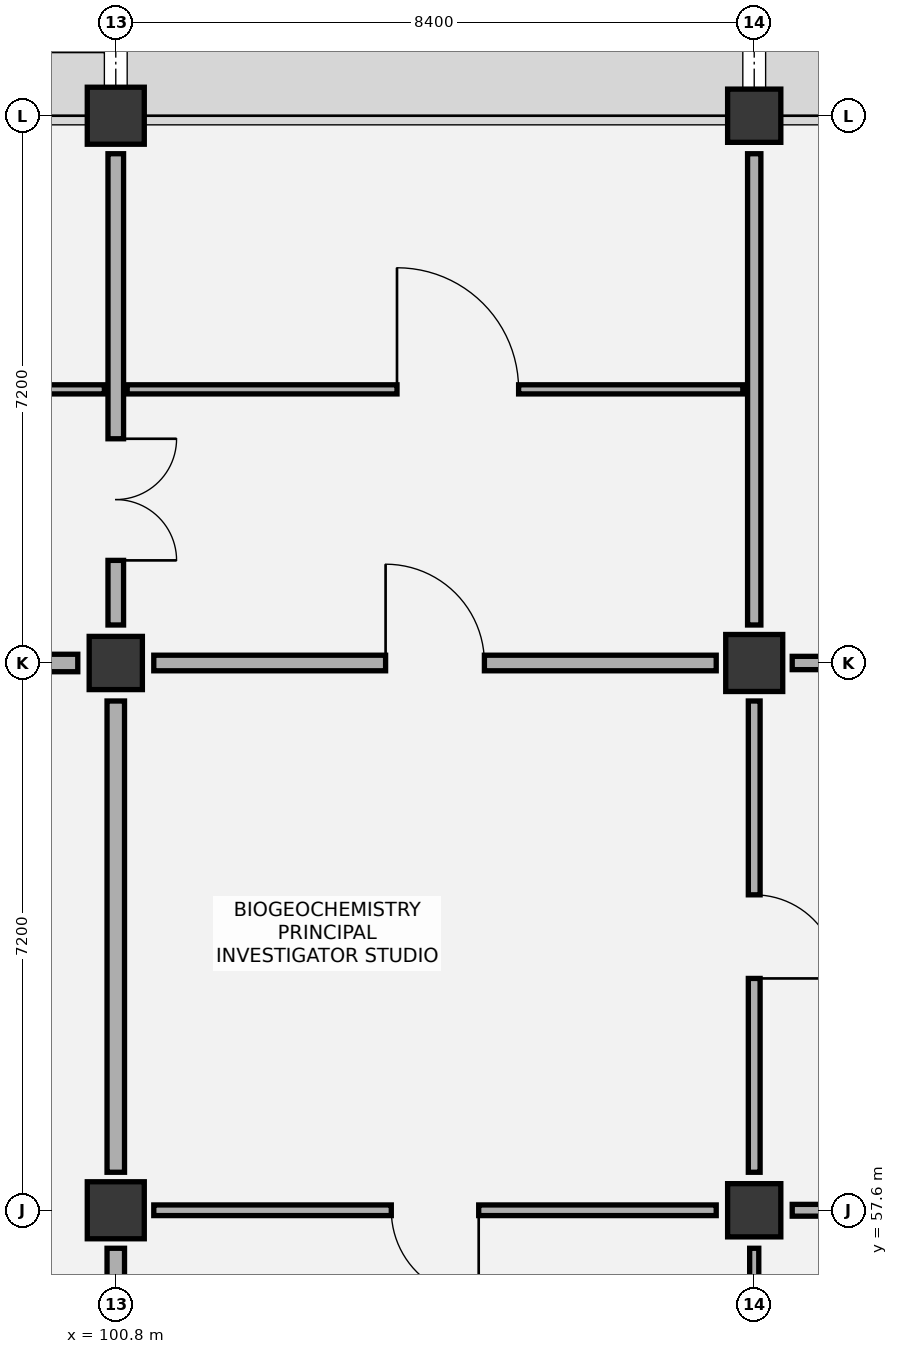
"""IFC4 building model, lengths in metres.
Left out: names, types, materials, properties, quantities, classifications, styles, units other than length and angle.
Written with IfcOpenShell. Run it as: python <this file> out.ifc"""

import sys

from ifc_helpers import new_model, si_unit, direction, frame, frame_2d, origin, origin_2d, place, context, subcontext, project, spatial, rectangle, extrude, element, fill, save


model = new_model("IFC4")
c1 = context("Model", 3, precision=1e-05, world=origin(), true_north=direction((0.0, 1.0)))
c2 = subcontext(c1, "Body", "Model", "MODEL_VIEW")
j1 = project(units=[si_unit("LENGTHUNIT", "METRE"), si_unit("PLANEANGLEUNIT", "RADIAN")], contexts=[c1])
p1 = place(None, origin())
s1 = spatial("IfcSite", under=j1, at=p1, CompositionType="ELEMENT")
p2 = place(p1, origin())
s2 = spatial("IfcBuilding", under=s1, at=p2, CompositionType="ELEMENT")
p3 = place(p2, frame((0.0, 0.0, 39.6)))
s3 = spatial("IfcBuildingStorey", under=s2, at=p3, CompositionType="ELEMENT", Elevation=39.6)
p4 = place(p3, frame((100.8, 57.6, 0.0), z_axis=(0.0, 0.0, 1.0), x_axis=(1.0, 0.0, 0.0)))
e1 = element("IfcColumn", 1, at=p4, inside=s3, PredefinedType="COLUMN", context=c2, shape_type="SweptSolid", body=[
    extrude(rectangle(XDim=0.75, YDim=0.75, at=origin_2d()), origin(), (0.0, 0.0, 1.0), 4.2),
])
p5 = place(p3, frame((100.8, 64.8, 0.0), z_axis=(0.0, 0.0, 1.0), x_axis=(1.0, 0.0, 0.0)))
e2 = element("IfcColumn", 2, at=p5, inside=s3, PredefinedType="COLUMN", context=c2, shape_type="SweptSolid", body=[
    extrude(rectangle(XDim=0.7, YDim=0.7, at=origin_2d()), origin(), (0.0, 0.0, 1.0), 4.2),
])
p6 = place(p3, frame((100.8, 72.0, 0.0), z_axis=(0.0, 0.0, 1.0), x_axis=(1.0, 0.0, 0.0)))
e3 = element("IfcColumn", 3, at=p6, inside=s3, PredefinedType="COLUMN", context=c2, shape_type="SweptSolid", body=[
    extrude(rectangle(XDim=0.75, YDim=0.75, at=origin_2d()), origin(), (0.0, 0.0, 1.0), 4.2),
])
p7 = place(p3, frame((109.2, 57.6, 0.0), z_axis=(0.0, 0.0, 1.0), x_axis=(1.0, 0.0, 0.0)))
e4 = element("IfcColumn", 4, at=p7, inside=s3, PredefinedType="COLUMN", context=c2, shape_type="SweptSolid", body=[
    extrude(rectangle(XDim=0.7, YDim=0.7, at=origin_2d()), origin(), (0.0, 0.0, 1.0), 4.2),
])
p8 = place(p3, frame((109.2, 64.8, 0.0), z_axis=(0.0, 0.0, 1.0), x_axis=(1.0, 0.0, 0.0)))
e5 = element("IfcColumn", 5, at=p8, inside=s3, PredefinedType="COLUMN", context=c2, shape_type="SweptSolid", body=[
    extrude(rectangle(XDim=0.75, YDim=0.75, at=origin_2d()), origin(), (0.0, 0.0, 1.0), 4.2),
])
p9 = place(p3, frame((109.2, 72.0, 0.0), z_axis=(0.0, 0.0, 1.0), x_axis=(1.0, 0.0, 0.0)))
e6 = element("IfcColumn", 6, at=p9, inside=s3, PredefinedType="COLUMN", context=c2, shape_type="SweptSolid", body=[
    extrude(rectangle(XDim=0.7, YDim=0.7, at=origin_2d()), origin(), (0.0, 0.0, 1.0), 4.2),
])
p10 = place(p3, frame((92.55, 68.4, 0.0), z_axis=(0.0, 0.0, 1.0), x_axis=(1.0, 0.0, 0.0)))
e7 = element("IfcWall", 7, at=p10, inside=s3, PredefinedType="PARTITIONING", context=c2, shape_type="SweptSolid", body=[
    extrude(rectangle(XDim=8.1, YDim=0.12, at=frame_2d((4.05, 0.0))), origin(), (0.0, 0.0, 1.0), 3.9),
])
p11 = place(p10, frame((3.55, 0.0, 0.0)))
e8 = element("IfcOpeningElement", 8, at=p11, cuts=e7, PredefinedType="OPENING", context=c2, shape_type="SweptSolid", body=[
    extrude(rectangle(XDim=1.6, YDim=2.2, at=frame_2d((0.8, 1.1))), frame((0.0, 0.07, 0.0), z_axis=(0.0, -1.0, 0.0), x_axis=(1.0, 0.0, 0.0)), (0.0, 0.0, 1.0), 0.14),
])
p12 = place(p3, frame((100.95, 68.4, 0.0), z_axis=(0.0, 0.0, 1.0), x_axis=(1.0, 0.0, 0.0)))
e9 = element("IfcWall", 9, at=p12, inside=s3, PredefinedType="PARTITIONING", context=c2, shape_type="SweptSolid", body=[
    extrude(rectangle(XDim=8.1, YDim=0.12, at=frame_2d((4.05, 0.0))), origin(), (0.0, 0.0, 1.0), 3.9),
])
p13 = place(p12, frame((3.55, 0.0, 0.0)))
e10 = element("IfcOpeningElement", 10, at=p13, cuts=e9, PredefinedType="OPENING", context=c2, shape_type="SweptSolid", body=[
    extrude(rectangle(XDim=1.6, YDim=2.2, at=frame_2d((0.8, 1.1))), frame((0.0, 0.07, 0.0), z_axis=(0.0, -1.0, 0.0), x_axis=(1.0, 0.0, 0.0)), (0.0, 0.0, 1.0), 0.14),
])
p14 = place(p3, frame((100.8, 50.9, 0.0), z_axis=(0.0, 0.0, 1.0), x_axis=(0.0, 1.0, 0.0)))
e11 = element("IfcWall", 11, at=p14, inside=s3, PredefinedType="PARTITIONING", context=c2, shape_type="SweptSolid", body=[
    extrude(rectangle(XDim=6.2, YDim=0.23, at=frame_2d((3.1, 0.0))), origin(), (0.0, 0.0, 1.0), 3.345),
])
p15 = place(p3, frame((100.8, 58.1, 0.0), z_axis=(0.0, 0.0, 1.0), x_axis=(0.0, 1.0, 0.0)))
e12 = element("IfcWall", 12, at=p15, inside=s3, PredefinedType="PARTITIONING", context=c2, shape_type="SweptSolid", body=[
    extrude(rectangle(XDim=6.2, YDim=0.23, at=frame_2d((3.1, 0.0))), origin(), (0.0, 0.0, 1.0), 3.395),
])
p16 = place(p3, frame((92.9, 64.8, 0.0), z_axis=(0.0, 0.0, 1.0), x_axis=(1.0, 0.0, 0.0)))
e13 = element("IfcWall", 13, at=p16, inside=s3, PredefinedType="PARTITIONING", context=c2, shape_type="SweptSolid", body=[
    extrude(rectangle(XDim=7.4, YDim=0.23, at=frame_2d((3.7, 0.0))), origin(), (0.0, 0.0, 1.0), 3.295),
])
p17 = place(p3, frame((100.8, 65.3, 0.0), z_axis=(0.0, 0.0, 1.0), x_axis=(0.0, 1.0, 0.0)))
e14 = element("IfcWall", 14, at=p17, inside=s3, PredefinedType="PARTITIONING", context=c2, shape_type="SweptSolid", body=[
    extrude(rectangle(XDim=6.2, YDim=0.205, at=frame_2d((3.1, 0.0))), origin(), (0.0, 0.0, 1.0), 3.345),
])
p18 = place(p17, frame((0.85, 0.0, 0.0)))
e15 = element("IfcOpeningElement", 15, at=p18, cuts=e14, PredefinedType="OPENING", context=c2, shape_type="SweptSolid", body=[
    extrude(rectangle(XDim=1.6, YDim=2.2, at=frame_2d((0.8, 1.1))), frame((0.0, 0.113, 0.0), z_axis=(0.0, -1.0, 0.0), x_axis=(1.0, 0.0, 0.0)), (0.0, 0.0, 1.0), 0.225),
])
p19 = place(p3, frame((109.2, 50.9, 0.0), z_axis=(0.0, 0.0, 1.0), x_axis=(0.0, 1.0, 0.0)))
e16 = element("IfcWall", 16, at=p19, inside=s3, PredefinedType="PARTITIONING", context=c2, shape_type="SweptSolid", body=[
    extrude(rectangle(XDim=6.2, YDim=0.12, at=frame_2d((3.1, 0.0))), origin(), (0.0, 0.0, 1.0), 3.395),
])
p20 = place(p3, frame((101.3, 57.6, 0.0), z_axis=(0.0, 0.0, 1.0), x_axis=(1.0, 0.0, 0.0)))
e17 = element("IfcWall", 17, at=p20, inside=s3, PredefinedType="PARTITIONING", context=c2, shape_type="SweptSolid", body=[
    extrude(rectangle(XDim=7.4, YDim=0.14, at=frame_2d((3.7, 0.0))), origin(), (0.0, 0.0, 1.0), 3.295),
])
p21 = place(p20, frame((3.125, 0.0, 0.0)))
e18 = element("IfcOpeningElement", 18, at=p21, cuts=e17, PredefinedType="OPENING", context=c2, shape_type="SweptSolid", body=[
    extrude(rectangle(XDim=1.15, YDim=2.1, at=frame_2d((0.575, 1.05))), frame((0.0, 0.08, 0.0), z_axis=(0.0, -1.0, 0.0), x_axis=(1.0, 0.0, 0.0)), (0.0, 0.0, 1.0), 0.16),
])
p22 = place(p3, frame((109.2, 58.1, 0.0), z_axis=(0.0, 0.0, 1.0), x_axis=(0.0, 1.0, 0.0)))
e19 = element("IfcWall", 19, at=p22, inside=s3, PredefinedType="PARTITIONING", context=c2, shape_type="SweptSolid", body=[
    extrude(rectangle(XDim=6.2, YDim=0.155, at=frame_2d((3.1, 0.0))), origin(), (0.0, 0.0, 1.0), 3.345),
])
p23 = place(p22, frame((2.55, 0.0, 0.0)))
e20 = element("IfcOpeningElement", 20, at=p23, cuts=e19, PredefinedType="OPENING", context=c2, shape_type="SweptSolid", body=[
    extrude(rectangle(XDim=1.1, YDim=2.1, at=frame_2d((0.55, 1.05))), frame((0.0, 0.087, 0.0), z_axis=(0.0, -1.0, 0.0), x_axis=(1.0, 0.0, 0.0)), (0.0, 0.0, 1.0), 0.175),
])
p24 = place(p3, frame((101.3, 64.8, 0.0), z_axis=(0.0, 0.0, 1.0), x_axis=(1.0, 0.0, 0.0)))
e21 = element("IfcWall", 21, at=p24, inside=s3, PredefinedType="PARTITIONING", context=c2, shape_type="SweptSolid", body=[
    extrude(rectangle(XDim=7.4, YDim=0.205, at=frame_2d((3.7, 0.0))), origin(), (0.0, 0.0, 1.0), 3.295),
])
p25 = place(p24, frame((3.05, 0.0, 0.0)))
e22 = element("IfcOpeningElement", 22, at=p25, cuts=e21, PredefinedType="OPENING", context=c2, shape_type="SweptSolid", body=[
    extrude(rectangle(XDim=1.3, YDim=2.15, at=frame_2d((0.65, 1.075))), frame((0.0, 0.113, 0.0), z_axis=(0.0, -1.0, 0.0), x_axis=(1.0, 0.0, 0.0)), (0.0, 0.0, 1.0), 0.225),
])
p26 = place(p3, frame((109.2, 65.3, 0.0), z_axis=(0.0, 0.0, 1.0), x_axis=(0.0, 1.0, 0.0)))
e23 = element("IfcWall", 23, at=p26, inside=s3, PredefinedType="PARTITIONING", context=c2, shape_type="SweptSolid", body=[
    extrude(rectangle(XDim=6.2, YDim=0.175, at=frame_2d((3.1, 0.0))), origin(), (0.0, 0.0, 1.0), 3.495),
])
p27 = place(p3, frame((109.7, 57.6, 0.0), z_axis=(0.0, 0.0, 1.0), x_axis=(1.0, 0.0, 0.0)))
e24 = element("IfcWall", 24, at=p27, inside=s3, PredefinedType="PARTITIONING", context=c2, shape_type="SweptSolid", body=[
    extrude(rectangle(XDim=7.4, YDim=0.155, at=frame_2d((3.7, 0.0))), origin(), (0.0, 0.0, 1.0), 3.295),
])
p28 = place(p27, frame((3.15, 0.0, 0.0)))
e25 = element("IfcOpeningElement", 25, at=p28, cuts=e24, PredefinedType="OPENING", context=c2, shape_type="SweptSolid", body=[
    extrude(rectangle(XDim=1.1, YDim=2.1, at=frame_2d((0.55, 1.05))), frame((0.0, 0.087, 0.0), z_axis=(0.0, -1.0, 0.0), x_axis=(1.0, 0.0, 0.0)), (0.0, 0.0, 1.0), 0.175),
])
p29 = place(p3, frame((109.7, 64.8, 0.0), z_axis=(0.0, 0.0, 1.0), x_axis=(1.0, 0.0, 0.0)))
e26 = element("IfcWall", 26, at=p29, inside=s3, PredefinedType="PARTITIONING", context=c2, shape_type="SweptSolid", body=[
    extrude(rectangle(XDim=7.4, YDim=0.175, at=frame_2d((3.7, 0.0))), origin(), (0.0, 0.0, 1.0), 3.295),
])
p30 = place(p29, frame((3.025, 0.0, 0.0)))
e27 = element("IfcOpeningElement", 27, at=p30, cuts=e26, PredefinedType="OPENING", context=c2, shape_type="SweptSolid", body=[
    extrude(rectangle(XDim=1.35, YDim=2.15, at=frame_2d((0.675, 1.075))), frame((0.0, 0.097, 0.0), z_axis=(0.0, -1.0, 0.0), x_axis=(1.0, 0.0, 0.0)), (0.0, 0.0, 1.0), 0.195),
])
p31 = place(p13, origin())
e28 = element("IfcDoor", 28, at=p31, inside=s3, OperationType="SINGLE_SWING_LEFT", PredefinedType="DOOR", context=c2, shape_type="SweptSolid", body=[
    extrude(rectangle(XDim=1.6, YDim=2.2, at=frame_2d((0.8, 1.1))), frame((0.0, 0.025, 0.0), z_axis=(0.0, -1.0, 0.0), x_axis=(1.0, 0.0, 0.0)), (0.0, 0.0, 1.0), 0.05),
])
fill(e10, e28)
p32 = place(p18, frame((1.6, 0.0, 0.0), z_axis=(0.0, 0.0, 1.0), x_axis=(-1.0, 0.0, 0.0)))
e29 = element("IfcDoor", 29, at=p32, inside=s3, OperationType="DOUBLE_DOOR_SINGLE_SWING", PredefinedType="DOOR", context=c2, shape_type="SweptSolid", body=[
    extrude(rectangle(XDim=1.6, YDim=2.2, at=frame_2d((0.8, 1.1))), frame((0.0, 0.025, 0.0), z_axis=(0.0, -1.0, 0.0), x_axis=(1.0, 0.0, 0.0)), (0.0, 0.0, 1.0), 0.05),
])
fill(e15, e29)
p33 = place(p21, frame((1.15, 0.0, 0.0), z_axis=(0.0, 0.0, 1.0), x_axis=(-1.0, 0.0, 0.0)))
e30 = element("IfcDoor", 30, at=p33, inside=s3, OperationType="SINGLE_SWING_LEFT", PredefinedType="DOOR", context=c2, shape_type="SweptSolid", body=[
    extrude(rectangle(XDim=1.15, YDim=2.1, at=frame_2d((0.575, 1.05))), frame((0.0, 0.025, 0.0), z_axis=(0.0, -1.0, 0.0), x_axis=(1.0, 0.0, 0.0)), (0.0, 0.0, 1.0), 0.05),
])
fill(e18, e30)
p34 = place(p23, frame((1.1, 0.0, 0.0), z_axis=(0.0, 0.0, 1.0), x_axis=(-1.0, 0.0, 0.0)))
e31 = element("IfcDoor", 31, at=p34, inside=s3, OperationType="SINGLE_SWING_RIGHT", PredefinedType="DOOR", context=c2, shape_type="SweptSolid", body=[
    extrude(rectangle(XDim=1.1, YDim=2.1, at=frame_2d((0.55, 1.05))), frame((0.0, 0.025, 0.0), z_axis=(0.0, -1.0, 0.0), x_axis=(1.0, 0.0, 0.0)), (0.0, 0.0, 1.0), 0.05),
])
fill(e20, e31)
p35 = place(p25, origin())
e32 = element("IfcDoor", 32, at=p35, inside=s3, OperationType="SINGLE_SWING_LEFT", PredefinedType="DOOR", context=c2, shape_type="SweptSolid", body=[
    extrude(rectangle(XDim=1.3, YDim=2.15, at=frame_2d((0.65, 1.075))), frame((0.0, 0.025, 0.0), z_axis=(0.0, -1.0, 0.0), x_axis=(1.0, 0.0, 0.0)), (0.0, 0.0, 1.0), 0.05),
])
fill(e22, e32)
save(model, sys.argv[1])
